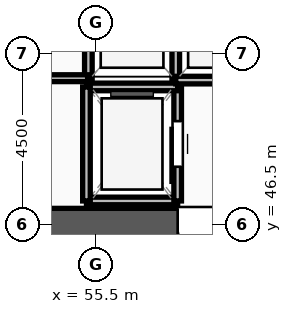
"""IFC4 building model, lengths in metres.
Left out: names, types, materials, properties, quantities, classifications, styles, units other than length and angle.
Written with IfcOpenShell. Run it as: python <this file> out.ifc"""

import sys

from ifc_helpers import new_model, si_unit, direction, frame, frame_2d, origin, place, context, subcontext, project, spatial, rectangle, extrude, source, transform, mapped, element, fill, save


model = new_model("IFC4")
c1 = context("Model", 3, precision=1e-05, world=origin(), true_north=direction((0.0, 1.0)))
c2 = subcontext(c1, "Body", "Model", "MODEL_VIEW")
j1 = project(units=[si_unit("LENGTHUNIT", "METRE"), si_unit("PLANEANGLEUNIT", "RADIAN")], contexts=[c1])
p1 = place(None, origin())
s1 = spatial("IfcSite", under=j1, at=p1, CompositionType="ELEMENT")
p2 = place(p1, origin())
s2 = spatial("IfcBuilding", under=s1, at=p2, CompositionType="ELEMENT")
p3 = place(p2, frame((0.0, 0.0, 47.25)))
s3 = spatial("IfcBuildingStorey", under=s2, at=p3, CompositionType="ELEMENT", Elevation=47.25)
p4 = place(p3, frame((59.175, 46.5, 0.0), z_axis=(0.0, 0.0, 1.0), x_axis=(-1.0, 0.0, 0.0)))
e1 = element("IfcWall", 1, at=p4, inside=s3, PredefinedType="SHEAR", context=c2, shape_type="SweptSolid", body=[
    extrude(rectangle(XDim=7.35, YDim=0.85, at=frame_2d((3.675, 0.0))), origin(), (0.0, 0.0, 1.0), 4.32),
])
m1 = source(origin(), c2, "Body", "SweptSolid", [
    extrude(rectangle(XDim=1.3, YDim=2.2, at=frame_2d((0.65, 1.1))), frame((0.0, 0.435, 0.0), z_axis=(0.0, -1.0, 0.0), x_axis=(1.0, 0.0, 0.0)), (0.0, 0.0, 1.0), 0.87),
])
p5 = place(p4, frame((5.025, 0.0, 0.0)))
e2 = element("IfcOpeningElement", 2, at=p5, cuts=e1, PredefinedType="OPENING", context=c2, shape_type="MappedRepresentation", body=[
    mapped(m1, transform((0.0, 0.0, 0.0), x_axis=(1.0, 0.0, 0.0), y_axis=(0.0, 1.0, 0.0), z_axis=(0.0, 0.0, 1.0), scale=1.0)),
])
m2 = source(origin(), c2, "Body", "SweptSolid", [
    extrude(rectangle(XDim=1.0, YDim=2.2, at=frame_2d((0.5, 1.1))), frame((0.0, 0.435, 0.0), z_axis=(0.0, -1.0, 0.0), x_axis=(1.0, 0.0, 0.0)), (0.0, 0.0, 1.0), 0.87),
])
p6 = place(p4, frame((0.525, 0.0, 0.0)))
e3 = element("IfcOpeningElement", 3, at=p6, cuts=e1, PredefinedType="OPENING", context=c2, shape_type="MappedRepresentation", body=[
    mapped(m2, transform((0.0, 0.0, 0.0), x_axis=(1.0, 0.0, 0.0), y_axis=(0.0, 1.0, 0.0), z_axis=(0.0, 0.0, 1.0), scale=1.0)),
])
p7 = place(p3, frame((55.25, 47.12, 0.0), z_axis=(0.0, 0.0, 1.0), x_axis=(1.0, 0.0, 0.0)))
e4 = element("IfcWall", 4, at=p7, inside=s3, PredefinedType="SOLIDWALL", context=c2, shape_type="SweptSolid", body=[
    extrude(rectangle(XDim=2.4, YDim=0.2, at=frame_2d((1.2, 0.0))), origin(), (0.0, 0.0, 1.0), 4.32),
])
p8 = place(p3, frame((57.65, 47.12, 0.0), z_axis=(0.0, 0.0, 1.0), x_axis=(0.0, 1.0, 0.0)))
e5 = element("IfcWall", 5, at=p8, inside=s3, PredefinedType="SOLIDWALL", context=c2, shape_type="SweptSolid", body=[
    extrude(rectangle(XDim=3.0, YDim=0.2, at=frame_2d((1.5, 0.0))), origin(), (0.0, 0.0, 1.0), 4.32),
])
m3 = source(origin(), c2, "Body", "SweptSolid", [
    extrude(rectangle(XDim=1.2, YDim=2.3, at=frame_2d((0.6, 1.15))), frame((0.0, 0.11, 0.0), z_axis=(0.0, -1.0, 0.0), x_axis=(1.0, 0.0, 0.0)), (0.0, 0.0, 1.0), 0.22),
])
p9 = place(p8, frame((0.9, 0.0, 0.0)))
e6 = element("IfcOpeningElement", 6, at=p9, cuts=e5, PredefinedType="OPENING", context=c2, shape_type="MappedRepresentation", body=[
    mapped(m3, transform((0.0, 0.0, 0.0), x_axis=(1.0, 0.0, 0.0), y_axis=(0.0, 1.0, 0.0), z_axis=(0.0, 0.0, 1.0), scale=1.0)),
])
p10 = place(p3, frame((57.65, 50.12, 0.0), z_axis=(0.0, 0.0, 1.0), x_axis=(-1.0, 0.0, 0.0)))
e7 = element("IfcWall", 7, at=p10, inside=s3, PredefinedType="SOLIDWALL", context=c2, shape_type="SweptSolid", body=[
    extrude(rectangle(XDim=2.4, YDim=0.2, at=frame_2d((1.2, 0.0))), origin(), (0.0, 0.0, 1.0), 4.32),
])
p11 = place(p3, frame((55.25, 50.12, 0.0), z_axis=(0.0, 0.0, 1.0), x_axis=(0.0, -1.0, 0.0)))
e8 = element("IfcWall", 8, at=p11, inside=s3, PredefinedType="SOLIDWALL", context=c2, shape_type="SweptSolid", body=[
    extrude(rectangle(XDim=3.0, YDim=0.2, at=frame_2d((1.5, 0.0))), origin(), (0.0, 0.0, 1.0), 4.32),
])
for number, where, z_axis, x_axis in (
    (9, (57.6, 50.3, 0.0), (0.0, 0.0, 1.0), (0.0, 1.0, 0.0)),
    (10, (55.3, 52.9, 0.0), (0.0, 0.0, 1.0), (0.0, -1.0, 0.0)),
):
    element("IfcWall", number, at=place(p3, frame(where, z_axis=z_axis, x_axis=x_axis)), inside=s3, PredefinedType="SOLIDWALL", context=c2, shape_type="SweptSolid", body=[
        extrude(rectangle(XDim=2.6, YDim=0.2, at=frame_2d((1.3, 0.0))), origin(), (0.0, 0.0, 1.0), 4.32),
    ])
p12 = place(p3, frame((57.6, 50.3, 0.0), z_axis=(0.0, 0.0, 1.0), x_axis=(1.0, 0.0, 0.0)))
e11 = element("IfcWall", 11, at=p12, inside=s3, PredefinedType="SOLIDWALL", context=c2, shape_type="SweptSolid", body=[
    extrude(rectangle(XDim=2.3, YDim=0.2, at=frame_2d((1.15, 0.0))), origin(), (0.0, 0.0, 1.0), 4.32),
])
p13 = place(p3, frame((53.79, 50.35, 0.0), z_axis=(0.0, 0.0, 1.0), x_axis=(1.0, 0.0, 0.0)))
e12 = element("IfcWall", 12, at=p13, inside=s3, PredefinedType="PARTITIONING", context=c2, shape_type="SweptSolid", body=[
    extrude(rectangle(XDim=1.49, YDim=0.18, at=frame_2d((0.745, 0.0))), origin(), (0.0, 0.0, 1.0), 4.32),
])
m4 = source(origin(), c2, "Body", "SweptSolid", [
    extrude(rectangle(XDim=1.0, YDim=2.2, at=frame_2d((0.5, 1.1))), frame((0.0, 0.025, 0.0), z_axis=(0.0, -1.0, 0.0), x_axis=(1.0, 0.0, 0.0)), (0.0, 0.0, 1.0), 0.05),
])
p14 = place(p6, origin())
e13 = element("IfcDoor", 13, at=p14, inside=s3, OperationType="SINGLE_SWING_LEFT", PredefinedType="DOOR", context=c2, shape_type="MappedRepresentation", body=[
    mapped(m4, transform((0.0, 0.0, 0.0), x_axis=(1.0, 0.0, 0.0), y_axis=(0.0, 1.0, 0.0), z_axis=(0.0, 0.0, 1.0), scale=1.0)),
])
fill(e3, e13)
m5 = source(origin(), c2, "Body", "SweptSolid", [
    extrude(rectangle(XDim=1.2, YDim=2.3, at=frame_2d((0.6, 1.15))), frame((0.0, 0.025, 0.0), z_axis=(0.0, -1.0, 0.0), x_axis=(1.0, 0.0, 0.0)), (0.0, 0.0, 1.0), 0.05),
])
p15 = place(p9, origin())
e14 = element("IfcDoor", 14, at=p15, inside=s3, OperationType="SLIDING_TO_LEFT", PredefinedType="DOOR", context=c2, shape_type="MappedRepresentation", body=[
    mapped(m5, transform((0.0, 0.0, 0.0), x_axis=(1.0, 0.0, 0.0), y_axis=(0.0, 1.0, 0.0), z_axis=(0.0, 0.0, 1.0), scale=1.0)),
])
fill(e6, e14)
save(model, sys.argv[1])
